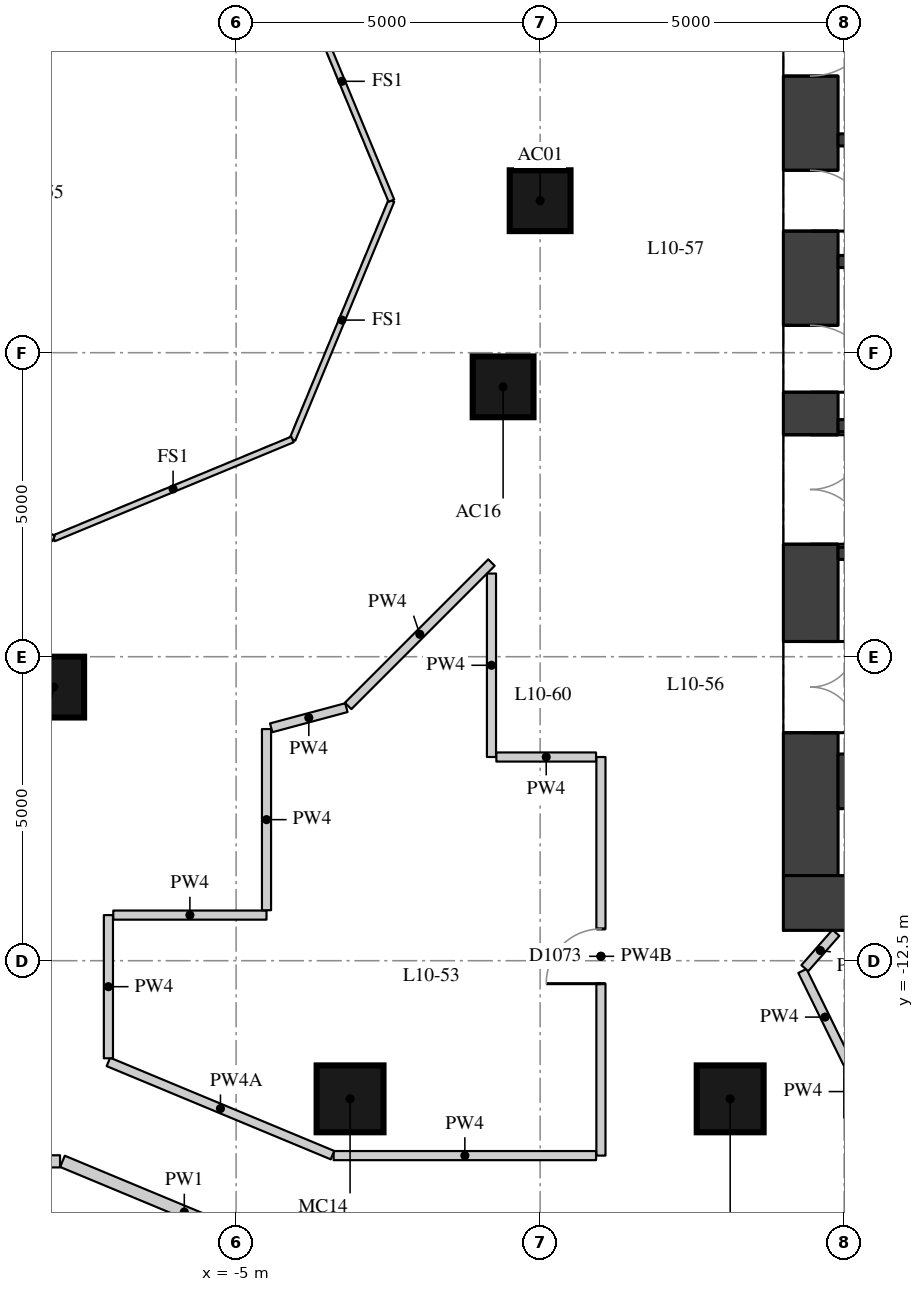
"""IFC4 building model, lengths in metres.
Left out: names, types, materials, properties, quantities, classifications, styles, units other than length and angle.
Written with IfcOpenShell. Run it as: python <this file> out.ifc"""

import sys

from ifc_helpers import new_model, si_unit, direction, frame, frame_2d, origin, origin_2d, place, context, subcontext, project, spatial, rectangle, extrude, element, fill, save


model = new_model("IFC4")
c1 = context("Model", 3, precision=1e-05, world=origin(), true_north=direction((0.0, 1.0)))
c2 = subcontext(c1, "Body", "Model", "MODEL_VIEW")
j1 = project(units=[si_unit("LENGTHUNIT", "METRE"), si_unit("PLANEANGLEUNIT", "RADIAN")], contexts=[c1])
p1 = place(None, origin())
s1 = spatial("IfcSite", under=j1, at=p1, CompositionType="ELEMENT")
p2 = place(p1, origin())
s2 = spatial("IfcBuilding", under=s1, at=p2, CompositionType="ELEMENT")
p3 = place(p2, frame((0.0, 0.0, 41.5)))
s3 = spatial("IfcBuildingStorey", under=s2, at=p3, CompositionType="ELEMENT", Elevation=41.5)
for number, where, z_axis, x_axis in (
    (1, (0.0, 0.0, 0.0), (0.0, 0.0, 1.0), (1.0, 0.0, 0.0)),
    (2, (-8.0, -8.0, 0.0), (0.0, 0.0, 1.0), (1.0, 0.0, 0.0)),
    (3, (-0.609, -3.062, 0.0), (0.0, 0.0, 1.0), (1.0, 0.0, 0.0)),
):
    element("IfcColumn", number, at=place(p3, frame(where, z_axis=z_axis, x_axis=x_axis)), inside=s3, PredefinedType="COLUMN", context=c2, shape_type="SweptSolid", body=[
        extrude(rectangle(XDim=1.0, YDim=1.0, at=origin_2d()), origin(), (0.0, 0.0, 1.0), 3.3),
    ])
for number, where, z_axis, x_axis in (
    (4, (-3.126, -14.772, 0.0), (0.0, 0.0, 1.0), (1.0, 0.0, 0.0)),
    (5, (3.126, -14.772, 0.0), (0.0, 0.0, 1.0), (1.0, 0.0, 0.0)),
):
    element("IfcColumn", number, at=place(p3, frame(where, z_axis=z_axis, x_axis=x_axis)), inside=s3, PredefinedType="COLUMN", context=c2, shape_type="SweptSolid", body=[
        extrude(rectangle(XDim=1.1, YDim=1.1, at=origin_2d()), origin(), (0.0, 0.0, 1.0), 3.3),
    ])
p4 = place(p3, frame((4.45, -11.1, 0.0), z_axis=(0.0, 0.0, 1.0), x_axis=(0.0, 1.0, 0.0)))
e6 = element("IfcWall", 6, at=p4, inside=s3, PredefinedType="SHEAR", context=c2, shape_type="SweptSolid", body=[
    extrude(rectangle(XDim=22.2, YDim=0.9, at=frame_2d((11.1, 0.0))), origin(), (0.0, 0.0, 1.0), 3.02),
])
p5 = place(p4, frame((2.35, 0.0, 0.0)))
e7 = element("IfcOpeningElement", 7, at=p5, cuts=e6, PredefinedType="OPENING", context=c2, shape_type="SweptSolid", body=[
    extrude(rectangle(XDim=1.5, YDim=2.1, at=frame_2d((0.75, 1.05))), frame((0.0, 0.46, 0.0), z_axis=(0.0, -1.0, 0.0), x_axis=(1.0, 0.0, 0.0)), (0.0, 0.0, 1.0), 0.92),
])
p6 = place(p4, frame((5.45, 0.0, 0.0)))
e8 = element("IfcOpeningElement", 8, at=p6, cuts=e6, PredefinedType="OPENING", context=c2, shape_type="SweptSolid", body=[
    extrude(rectangle(XDim=1.8, YDim=2.1, at=frame_2d((0.9, 1.05))), frame((0.0, 0.46, 0.0), z_axis=(0.0, -1.0, 0.0), x_axis=(1.0, 0.0, 0.0)), (0.0, 0.0, 1.0), 0.92),
])
p7 = place(p4, frame((7.95, 0.0, 0.0)))
e9 = element("IfcOpeningElement", 9, at=p7, cuts=e6, PredefinedType="OPENING", context=c2, shape_type="SweptSolid", body=[
    extrude(rectangle(XDim=1.1, YDim=2.1, at=frame_2d((0.55, 1.05))), frame((0.0, 0.46, 0.0), z_axis=(0.0, -1.0, 0.0), x_axis=(1.0, 0.0, 0.0)), (0.0, 0.0, 1.0), 0.92),
])
p8 = place(p4, frame((10.6, 0.0, 0.0)))
e10 = element("IfcOpeningElement", 10, at=p8, cuts=e6, PredefinedType="OPENING", context=c2, shape_type="SweptSolid", body=[
    extrude(rectangle(XDim=1.0, YDim=2.1, at=frame_2d((0.5, 1.05))), frame((0.0, 0.46, 0.0), z_axis=(0.0, -1.0, 0.0), x_axis=(1.0, 0.0, 0.0)), (0.0, 0.0, 1.0), 0.92),
])
p9 = place(p4, frame((13.15, 0.0, 0.0)))
e11 = element("IfcOpeningElement", 11, at=p9, cuts=e6, PredefinedType="OPENING", context=c2, shape_type="SweptSolid", body=[
    extrude(rectangle(XDim=1.1, YDim=2.1, at=frame_2d((0.55, 1.05))), frame((0.0, 0.46, 0.0), z_axis=(0.0, -1.0, 0.0), x_axis=(1.0, 0.0, 0.0)), (0.0, 0.0, 1.0), 0.92),
])
p10 = place(p4, frame((14.95, 0.0, 0.0)))
e12 = element("IfcOpeningElement", 12, at=p10, cuts=e6, PredefinedType="OPENING", context=c2, shape_type="SweptSolid", body=[
    extrude(rectangle(XDim=1.8, YDim=2.1, at=frame_2d((0.9, 1.05))), frame((0.0, 0.46, 0.0), z_axis=(0.0, -1.0, 0.0), x_axis=(1.0, 0.0, 0.0)), (0.0, 0.0, 1.0), 0.92),
])
p11 = place(p4, frame((18.35, 0.0, 0.0)))
e13 = element("IfcOpeningElement", 13, at=p11, cuts=e6, PredefinedType="OPENING", context=c2, shape_type="SweptSolid", body=[
    extrude(rectangle(XDim=1.5, YDim=2.1, at=frame_2d((0.75, 1.05))), frame((0.0, 0.46, 0.0), z_axis=(0.0, -1.0, 0.0), x_axis=(1.0, 0.0, 0.0)), (0.0, 0.0, 1.0), 0.92),
])
p12 = place(p3, frame((4.0, -11.55, 0.0), z_axis=(0.0, 0.0, 1.0), x_axis=(1.0, 0.0, 0.0)))
e14 = element("IfcWall", 14, at=p12, inside=s3, PredefinedType="SHEAR", context=c2, shape_type="SweptSolid", body=[
    extrude(rectangle(XDim=15.2, YDim=0.9, at=frame_2d((7.6, 0.0))), origin(), (0.0, 0.0, 1.0), 3.02),
])
p13 = place(p3, frame((4.9, -9.55, 0.0), z_axis=(0.0, 0.0, 1.0), x_axis=(1.0, 0.0, 0.0)))
e15 = element("IfcWall", 15, at=p13, inside=s3, PredefinedType="SHEAR", context=c2, shape_type="SweptSolid", body=[
    extrude(rectangle(XDim=10.2, YDim=0.9, at=frame_2d((5.1, 0.0))), origin(), (0.0, 0.0, 1.0), 3.02),
])
for number, where, z_axis, x_axis in (
    (16, (4.9, 1.0, 0.0), (0.0, 0.0, 1.0), (1.0, 0.0, 0.0)),
    (17, (4.9, -1.0, 0.0), (0.0, 0.0, 1.0), (1.0, 0.0, 0.0)),
):
    element("IfcWall", number, at=place(p3, frame(where, z_axis=z_axis, x_axis=x_axis)), inside=s3, PredefinedType="SHEAR", context=c2, shape_type="SweptSolid", body=[
        extrude(rectangle(XDim=10.2, YDim=0.2, at=frame_2d((5.1, 0.0))), origin(), (0.0, 0.0, 1.0), 3.02),
    ])
p14 = place(p3, frame((4.9, -3.7, 0.0), z_axis=(0.0, 0.0, 1.0), x_axis=(1.0, 0.0, 0.0)))
e18 = element("IfcWall", 18, at=p14, inside=s3, PredefinedType="SHEAR", context=c2, shape_type="SweptSolid", body=[
    extrude(rectangle(XDim=10.2, YDim=0.2, at=frame_2d((5.1, 0.0))), origin(), (0.0, 0.0, 1.0), 3.02),
])
p15 = place(p14, frame((6.3, 0.0, 0.0)))
e19 = element("IfcOpeningElement", 19, at=p15, cuts=e18, PredefinedType="OPENING", context=c2, shape_type="SweptSolid", body=[
    extrude(rectangle(XDim=1.1, YDim=2.1, at=frame_2d((0.55, 1.05))), frame((0.0, 0.11, 0.0), z_axis=(0.0, -1.0, 0.0), x_axis=(1.0, 0.0, 0.0)), (0.0, 0.0, 1.0), 0.22),
])
p16 = place(p14, frame((8.6, 0.0, 0.0)))
e20 = element("IfcOpeningElement", 20, at=p16, cuts=e18, PredefinedType="OPENING", context=c2, shape_type="SweptSolid", body=[
    extrude(rectangle(XDim=1.1, YDim=2.1, at=frame_2d((0.55, 1.05))), frame((0.0, 0.11, 0.0), z_axis=(0.0, -1.0, 0.0), x_axis=(1.0, 0.0, 0.0)), (0.0, 0.0, 1.0), 0.22),
])
p17 = place(p3, frame((4.9, -5.8, 0.0), z_axis=(0.0, 0.0, 1.0), x_axis=(1.0, 0.0, 0.0)))
e21 = element("IfcWall", 21, at=p17, inside=s3, PredefinedType="SHEAR", context=c2, shape_type="SweptSolid", body=[
    extrude(rectangle(XDim=10.2, YDim=0.2, at=frame_2d((5.1, 0.0))), origin(), (0.0, 0.0, 1.0), 3.02),
])
p18 = place(p3, frame((10.692, -15.247, 0.0), z_axis=(0.0, 0.0, 1.0), x_axis=(-0.950852414815, -0.309644449718, 0.0)))
e22 = element("IfcWall", 22, at=p18, inside=s3, PredefinedType="PARTITIONING", context=c2, shape_type="SweptSolid", body=[
    extrude(rectangle(XDim=7.296, YDim=0.2, at=frame_2d((3.648, 0.0))), origin(), (0.0, 0.0, 1.0), 3.02),
])
p19 = place(p18, frame((4.327, 0.0, 0.0)))
e23 = element("IfcOpeningElement", 23, at=p19, cuts=e22, PredefinedType="OPENING", context=c2, shape_type="SweptSolid", body=[
    extrude(rectangle(XDim=1.0, YDim=2.1, at=frame_2d((0.5, 1.05))), frame((0.0, 0.11, 0.0), z_axis=(0.0, -1.0, 0.0), x_axis=(1.0, 0.0, 0.0)), (0.0, 0.0, 1.0), 0.22),
])
p20 = place(p18, frame((0.22, 0.0, 0.0)))
e24 = element("IfcOpeningElement", 24, at=p20, cuts=e22, PredefinedType="OPENING", context=c2, shape_type="SweptSolid", body=[
    extrude(rectangle(XDim=1.1, YDim=2.1, at=frame_2d((0.55, 1.05))), frame((0.0, 0.11, 0.0), z_axis=(0.0, -1.0, 0.0), x_axis=(1.0, 0.0, 0.0)), (0.0, 0.0, 1.0), 0.22),
])
p21 = place(p3, frame((-3.848, -17.468, 0.0), z_axis=(0.0, 0.0, 1.0), x_axis=(-0.923248226412, 0.384203998454, 0.0)))
e25 = element("IfcWall", 25, at=p21, inside=s3, PredefinedType="PARTITIONING", context=c2, shape_type="SweptSolid", body=[
    extrude(rectangle(XDim=4.341, YDim=0.2, at=frame_2d((2.17, 0.0))), origin(), (0.0, 0.0, 1.0), 3.02),
])
p22 = place(p3, frame((-7.896, -15.8, 0.0), z_axis=(0.0, 0.0, 1.0), x_axis=(-1.0, 0.0, 0.0)))
e26 = element("IfcWall", 26, at=p22, inside=s3, PredefinedType="PARTITIONING", context=c2, shape_type="SweptSolid", body=[
    extrude(rectangle(XDim=2.858, YDim=0.2, at=frame_2d((1.429, 0.0))), origin(), (0.0, 0.0, 1.0), 3.02),
])
p23 = place(p22, frame((1.538, 0.0, 0.0)))
e27 = element("IfcOpeningElement", 27, at=p23, cuts=e26, PredefinedType="OPENING", context=c2, shape_type="SweptSolid", body=[
    extrude(rectangle(XDim=1.1, YDim=2.1, at=frame_2d((0.55, 1.05))), frame((0.0, 0.11, 0.0), z_axis=(0.0, -1.0, 0.0), x_axis=(1.0, 0.0, 0.0)), (0.0, 0.0, 1.0), 0.22),
])
p24 = place(p3, frame((1.0, -9.15, 0.0), z_axis=(0.0, 0.0, 1.0), x_axis=(0.0, -1.0, 0.0)))
e28 = element("IfcWall", 28, at=p24, inside=s3, PredefinedType="PARTITIONING", context=c2, shape_type="SweptSolid", body=[
    extrude(rectangle(XDim=6.556, YDim=0.15, at=frame_2d((3.278, 0.0))), origin(), (0.0, 0.0, 1.0), 2.47),
])
p25 = place(p24, frame((2.828, 0.0, 0.0)))
e29 = element("IfcOpeningElement", 29, at=p25, cuts=e28, PredefinedType="OPENING", context=c2, shape_type="SweptSolid", body=[
    extrude(rectangle(XDim=0.9, YDim=2.1, at=frame_2d((0.45, 1.05))), frame((0.0, 0.085, 0.0), z_axis=(0.0, -1.0, 0.0), x_axis=(1.0, 0.0, 0.0)), (0.0, 0.0, 1.0), 0.17),
])
p26 = place(p3, frame((0.92, -15.706, 0.0), z_axis=(0.0, 0.0, 1.0), x_axis=(-1.0, 0.0, 0.0)))
e30 = element("IfcWall", 30, at=p26, inside=s3, PredefinedType="PARTITIONING", context=c2, shape_type="SweptSolid", body=[
    extrude(rectangle(XDim=4.316, YDim=0.15, at=frame_2d((2.158, 0.0))), origin(), (0.0, 0.0, 1.0), 3.02),
])
p27 = place(p3, frame((-3.415, -15.698, 0.0), z_axis=(0.0, 0.0, 1.0), x_axis=(-0.923293917367, 0.38409418396, 0.0)))
e31 = element("IfcWall", 31, at=p27, inside=s3, PredefinedType="PARTITIONING", context=c2, shape_type="SweptSolid", body=[
    extrude(rectangle(XDim=3.992, YDim=0.15, at=frame_2d((1.996, 0.0))), origin(), (0.0, 0.0, 1.0), 2.57),
])
p28 = place(p3, frame((-7.1, -14.105, 0.0), z_axis=(0.0, 0.0, 1.0), x_axis=(0.0, 1.0, 0.0)))
e32 = element("IfcWall", 32, at=p28, inside=s3, PredefinedType="PARTITIONING", context=c2, shape_type="SweptSolid", body=[
    extrude(rectangle(XDim=2.355, YDim=0.15, at=frame_2d((1.177, 0.0))), origin(), (0.0, 0.0, 1.0), 3.02),
])
p29 = place(p3, frame((-7.02, -11.75, 0.0), z_axis=(0.0, 0.0, 1.0), x_axis=(1.0, 0.0, 0.0)))
e33 = element("IfcWall", 33, at=p29, inside=s3, PredefinedType="PARTITIONING", context=c2, shape_type="SweptSolid", body=[
    extrude(rectangle(XDim=2.52, YDim=0.15, at=frame_2d((1.26, 0.0))), origin(), (0.0, 0.0, 1.0), 3.02),
])
p30 = place(p3, frame((-4.5, -11.67, 0.0), z_axis=(0.0, 0.0, 1.0), x_axis=(0.0, 1.0, 0.0)))
e34 = element("IfcWall", 34, at=p30, inside=s3, PredefinedType="PARTITIONING", context=c2, shape_type="SweptSolid", body=[
    extrude(rectangle(XDim=2.98, YDim=0.15, at=frame_2d((1.49, 0.0))), origin(), (0.0, 0.0, 1.0), 3.02),
])
p31 = place(p3, frame((-4.423, -8.67, 0.0), z_axis=(0.0, 0.0, 1.0), x_axis=(0.965898680525, 0.258920333232, 0.0)))
e35 = element("IfcWall", 35, at=p31, inside=s3, PredefinedType="PARTITIONING", context=c2, shape_type="SweptSolid", body=[
    extrude(rectangle(XDim=1.281, YDim=0.15, at=frame_2d((0.64, 0.0))), origin(), (0.0, 0.0, 1.0), 3.02),
])
p32 = place(p3, frame((-3.158, -8.31, 0.0), z_axis=(0.0, 0.0, 1.0), x_axis=(0.707106781187, 0.707106781187, 0.0)))
e36 = element("IfcWall", 36, at=p32, inside=s3, PredefinedType="PARTITIONING", context=c2, shape_type="SweptSolid", body=[
    extrude(rectangle(XDim=3.334, YDim=0.15, at=frame_2d((1.667, 0.0))), origin(), (0.0, 0.0, 1.0), 3.02),
])
p33 = place(p3, frame((-0.8, -6.132, 0.0), z_axis=(0.0, 0.0, 1.0), x_axis=(0.0, -1.0, 0.0)))
e37 = element("IfcWall", 37, at=p33, inside=s3, PredefinedType="PARTITIONING", context=c2, shape_type="SweptSolid", body=[
    extrude(rectangle(XDim=3.018, YDim=0.15, at=frame_2d((1.509, 0.0))), origin(), (0.0, 0.0, 1.0), 3.02),
])
p34 = place(p3, frame((-0.72, -9.15, 0.0), z_axis=(0.0, 0.0, 1.0), x_axis=(1.0, 0.0, 0.0)))
e38 = element("IfcWall", 38, at=p34, inside=s3, PredefinedType="PARTITIONING", context=c2, shape_type="SweptSolid", body=[
    extrude(rectangle(XDim=1.64, YDim=0.15, at=frame_2d((0.82, 0.0))), origin(), (0.0, 0.0, 1.0), 3.02),
])
p35 = place(p3, frame((5.058, -14.186, 0.0), z_axis=(0.0, 0.0, 1.0), x_axis=(-0.440556792244, 0.897724742228, 0.0)))
e39 = element("IfcWall", 39, at=p35, inside=s3, PredefinedType="PARTITIONING", context=c2, shape_type="SweptSolid", body=[
    extrude(rectangle(XDim=1.69, YDim=0.15, at=frame_2d((0.845, 0.0))), origin(), (0.0, 0.0, 1.0), 3.02),
])
p36 = place(p3, frame((4.353, -12.623, 0.0), z_axis=(0.0, 0.0, 1.0), x_axis=(0.660265480509, 0.751032286422, 0.0)))
e40 = element("IfcWall", 40, at=p36, inside=s3, PredefinedType="PARTITIONING", context=c2, shape_type="SweptSolid", body=[
    extrude(rectangle(XDim=0.775, YDim=0.15, at=frame_2d((0.387, 0.0))), origin(), (0.0, 0.0, 1.0), 2.57),
])
for number, where, z_axis, x_axis in (
    (41, (-2.446, 0.0, 0.0), (0.0, 0.0, 1.0), (-0.383, -0.924, 0.0)),
    (42, (-4.073, -3.927, 0.0), (0.0, 0.0, 1.0), (-0.924, -0.383, 0.0)),
    (43, (-8.0, -5.554, 0.0), (0.0, 0.0, 1.0), (-0.924, 0.383, 0.0)),
    (44, (-4.073, 3.927, 0.0), (0.0, 0.0, 1.0), (0.383, -0.924, 0.0)),
):
    element("IfcWall", number, at=place(p3, frame(where, z_axis=z_axis, x_axis=x_axis)), inside=s3, PredefinedType="PARTITIONING", context=c2, shape_type="SweptSolid", body=[
        extrude(rectangle(XDim=4.251, YDim=0.1, at=frame_2d((2.125, 0.0))), origin(), (0.0, 0.0, 1.0), 3.02),
    ])
p37 = place(p5, origin())
e45 = element("IfcDoor", 45, at=p37, inside=s3, OperationType="DOUBLE_DOOR_SINGLE_SWING", PredefinedType="DOOR", context=c2, shape_type="SweptSolid", body=[
    extrude(rectangle(XDim=1.5, YDim=2.1, at=frame_2d((0.75, 1.05))), frame((0.0, 0.025, 0.0), z_axis=(0.0, -1.0, 0.0), x_axis=(1.0, 0.0, 0.0)), (0.0, 0.0, 1.0), 0.05),
])
fill(e7, e45)
p38 = place(p6, origin())
e46 = element("IfcDoor", 46, at=p38, inside=s3, OperationType="DOUBLE_DOOR_SINGLE_SWING", PredefinedType="DOOR", context=c2, shape_type="SweptSolid", body=[
    extrude(rectangle(XDim=1.8, YDim=2.1, at=frame_2d((0.9, 1.05))), frame((0.0, 0.025, 0.0), z_axis=(0.0, -1.0, 0.0), x_axis=(1.0, 0.0, 0.0)), (0.0, 0.0, 1.0), 0.05),
])
fill(e8, e46)
p39 = place(p7, origin())
e47 = element("IfcDoor", 47, at=p39, inside=s3, OperationType="SINGLE_SWING_RIGHT", PredefinedType="DOOR", context=c2, shape_type="SweptSolid", body=[
    extrude(rectangle(XDim=1.1, YDim=2.1, at=frame_2d((0.55, 1.05))), frame((0.0, 0.025, 0.0), z_axis=(0.0, -1.0, 0.0), x_axis=(1.0, 0.0, 0.0)), (0.0, 0.0, 1.0), 0.05),
])
fill(e9, e47)
p40 = place(p8, origin())
e48 = element("IfcDoor", 48, at=p40, inside=s3, OperationType="SINGLE_SWING_RIGHT", PredefinedType="DOOR", context=c2, shape_type="SweptSolid", body=[
    extrude(rectangle(XDim=1.0, YDim=2.1, at=frame_2d((0.5, 1.05))), frame((0.0, 0.025, 0.0), z_axis=(0.0, -1.0, 0.0), x_axis=(1.0, 0.0, 0.0)), (0.0, 0.0, 1.0), 0.05),
])
fill(e10, e48)
p41 = place(p9, origin())
e49 = element("IfcDoor", 49, at=p41, inside=s3, OperationType="SINGLE_SWING_LEFT", PredefinedType="DOOR", context=c2, shape_type="SweptSolid", body=[
    extrude(rectangle(XDim=1.1, YDim=2.1, at=frame_2d((0.55, 1.05))), frame((0.0, 0.025, 0.0), z_axis=(0.0, -1.0, 0.0), x_axis=(1.0, 0.0, 0.0)), (0.0, 0.0, 1.0), 0.05),
])
fill(e11, e49)
p42 = place(p25, origin())
e50 = element("IfcDoor", 50, at=p42, inside=s3, OperationType="SINGLE_SWING_LEFT", PredefinedType="DOOR", context=c2, shape_type="SweptSolid", body=[
    extrude(rectangle(XDim=0.9, YDim=2.1, at=frame_2d((0.45, 1.05))), frame((0.0, 0.025, 0.0), z_axis=(0.0, -1.0, 0.0), x_axis=(1.0, 0.0, 0.0)), (0.0, 0.0, 1.0), 0.05),
])
fill(e29, e50)
save(model, sys.argv[1])
